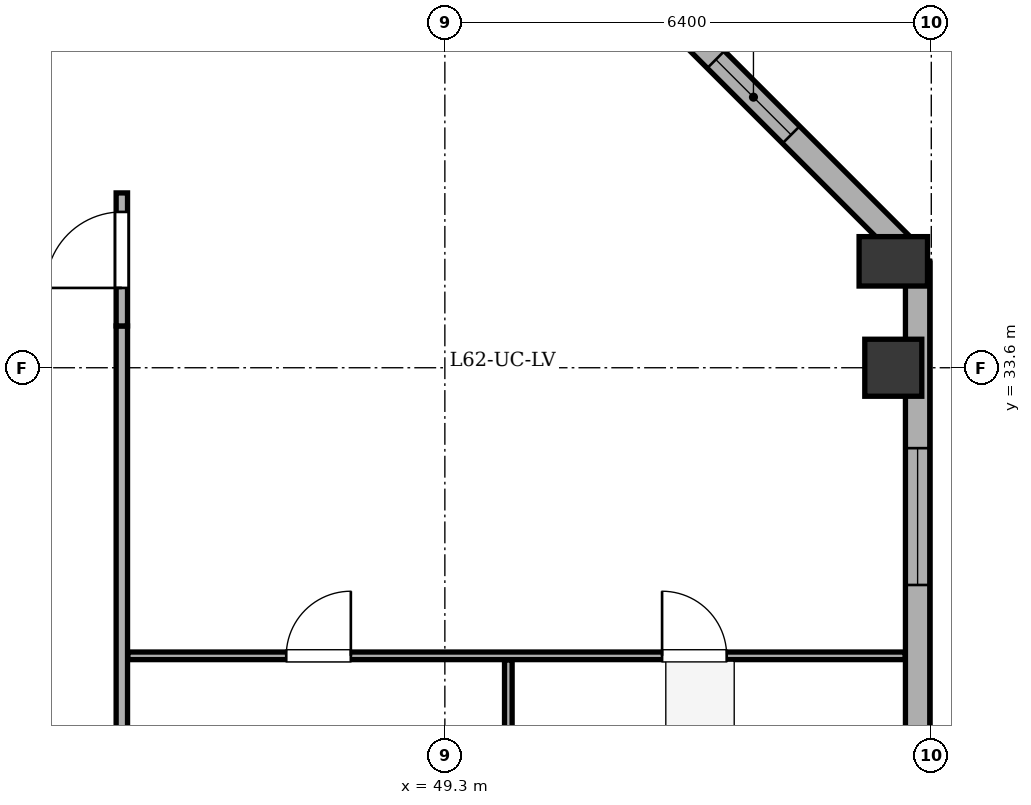
"""IFC4 building model, lengths in metres.
Left out: names, types, materials, properties, quantities, classifications, styles, units other than length and angle.
Written with IfcOpenShell. Run it as: python <this file> out.ifc"""

import sys

from ifc_helpers import new_model, si_unit, direction, frame, frame_2d, origin, origin_2d, place, context, subcontext, project, spatial, rectangle, extrude, element, fill, save


model = new_model("IFC4")
c1 = context("Model", 3, precision=1e-05, world=origin(), true_north=direction((0.0, 1.0)))
c2 = subcontext(c1, "Body", "Model", "MODEL_VIEW")
j1 = project(units=[si_unit("LENGTHUNIT", "METRE"), si_unit("PLANEANGLEUNIT", "RADIAN")], contexts=[c1])
p1 = place(None, origin())
s1 = spatial("IfcSite", under=j1, at=p1, CompositionType="ELEMENT")
p2 = place(p1, origin())
s2 = spatial("IfcBuilding", under=s1, at=p2, CompositionType="ELEMENT")
p3 = place(p2, frame((0.0, 0.0, 238.1)))
s3 = spatial("IfcBuildingStorey", under=s2, at=p3, CompositionType="ELEMENT", Elevation=238.1)
p4 = place(p3, frame((55.2, 33.6, 0.0), z_axis=(0.0, 0.0, 1.0), x_axis=(1.0, 0.0, 0.0)))
e1 = element("IfcColumn", 1, at=p4, inside=s3, PredefinedType="COLUMN", context=c2, shape_type="SweptSolid", body=[
    extrude(rectangle(XDim=0.75, YDim=0.75, at=origin_2d()), origin(), (0.0, 0.0, 1.0), 3.4),
])
p5 = place(p3, frame((55.2, 35.0, 0.0), z_axis=(0.0, 0.0, 1.0), x_axis=(1.0, 0.0, 0.0)))
e2 = element("IfcColumn", 2, at=p5, inside=s3, PredefinedType="COLUMN", context=c2, shape_type="SweptSolid", body=[
    extrude(rectangle(XDim=0.65, YDim=0.9, at=origin_2d()), origin(), (0.0, 0.0, 1.0), 3.4),
])
p6 = place(p3, frame((51.2, 39.32, 0.0), z_axis=(0.0, 0.0, 1.0), x_axis=(0.707106781187, -0.707106781187, 0.0)))
e3 = element("IfcWall", 3, at=p6, inside=s3, PredefinedType="STANDARD", context=c2, shape_type="SweptSolid", body=[
    extrude(rectangle(XDim=6.11, YDim=0.32, at=frame_2d((3.055, 0.0))), origin(), (0.0, 0.0, 1.0), 2.725),
])
p7 = place(p6, frame((2.355, 0.0, 0.75)))
e4 = element("IfcOpeningElement", 4, at=p7, cuts=e3, PredefinedType="OPENING", context=c2, shape_type="SweptSolid", body=[
    extrude(rectangle(XDim=1.4, YDim=1.65, at=frame_2d((0.7, 0.825))), frame((0.0, 0.17, 0.0), z_axis=(0.0, -1.0, 0.0), x_axis=(1.0, 0.0, 0.0)), (0.0, 0.0, 1.0), 0.34),
])
p8 = place(p3, frame((55.52, 35.0, 0.0), z_axis=(0.0, 0.0, 1.0), x_axis=(0.0, -1.0, 0.0)))
e5 = element("IfcWall", 5, at=p8, inside=s3, PredefinedType="STANDARD", context=c2, shape_type="SweptSolid", body=[
    extrude(rectangle(XDim=27.8, YDim=0.32, at=frame_2d((13.9, 0.0))), origin(), (0.0, 0.0, 1.0), 2.725),
])
p9 = place(p8, frame((2.458, 0.0, 0.75)))
e6 = element("IfcOpeningElement", 6, at=p9, cuts=e5, PredefinedType="OPENING", context=c2, shape_type="SweptSolid", body=[
    extrude(rectangle(XDim=1.8, YDim=1.7, at=frame_2d((0.9, 0.85))), frame((0.0, 0.17, 0.0), z_axis=(0.0, -1.0, 0.0), x_axis=(1.0, 0.0, 0.0)), (0.0, 0.0, 1.0), 0.34),
])
p10 = place(p8, frame((11.342, 0.0, 0.75)))
e7 = element("IfcOpeningElement", 7, at=p10, cuts=e5, PredefinedType="OPENING", context=c2, shape_type="SweptSolid", body=[
    extrude(rectangle(XDim=1.8, YDim=1.7, at=frame_2d((0.9, 0.85))), frame((0.0, 0.17, 0.0), z_axis=(0.0, -1.0, 0.0), x_axis=(1.0, 0.0, 0.0)), (0.0, 0.0, 1.0), 0.34),
])
p11 = place(p8, frame((17.117, 0.0, 0.75)))
e8 = element("IfcOpeningElement", 8, at=p11, cuts=e5, PredefinedType="OPENING", context=c2, shape_type="SweptSolid", body=[
    extrude(rectangle(XDim=1.8, YDim=1.7, at=frame_2d((0.9, 0.85))), frame((0.0, 0.17, 0.0), z_axis=(0.0, -1.0, 0.0), x_axis=(1.0, 0.0, 0.0)), (0.0, 0.0, 1.0), 0.34),
])
p12 = place(p8, frame((22.808, 0.0, 0.75)))
e9 = element("IfcOpeningElement", 9, at=p12, cuts=e5, PredefinedType="OPENING", context=c2, shape_type="SweptSolid", body=[
    extrude(rectangle(XDim=2.2, YDim=1.7, at=frame_2d((1.1, 0.85))), frame((0.0, 0.17, 0.0), z_axis=(0.0, -1.0, 0.0), x_axis=(1.0, 0.0, 0.0)), (0.0, 0.0, 1.0), 0.34),
])
p13 = place(p3, frame((45.05, 20.25, 0.0), z_axis=(0.0, 0.0, 1.0), x_axis=(0.0, 1.0, 0.0)))
e10 = element("IfcWall", 10, at=p13, inside=s3, PredefinedType="PARTITIONING", context=c2, shape_type="SweptSolid", body=[
    extrude(rectangle(XDim=13.9, YDim=0.15, at=frame_2d((6.95, 0.0))), origin(), (0.0, 0.0, 1.0), 2.725),
])
p14 = place(p3, frame((45.05, 34.15, 0.0), z_axis=(0.0, 0.0, 1.0), x_axis=(0.0, 1.0, 0.0)))
e11 = element("IfcWall", 11, at=p14, inside=s3, PredefinedType="PARTITIONING", context=c2, shape_type="SweptSolid", body=[
    extrude(rectangle(XDim=1.75, YDim=0.15, at=frame_2d((0.875, 0.0))), origin(), (0.0, 0.0, 1.0), 2.725),
])
p15 = place(p14, frame((0.5, 0.0, 0.0)))
e12 = element("IfcOpeningElement", 12, at=p15, cuts=e11, PredefinedType="OPENING", context=c2, shape_type="SweptSolid", body=[
    extrude(rectangle(XDim=1.0, YDim=2.1, at=frame_2d((0.5, 1.05))), frame((0.0, 0.085, 0.0), z_axis=(0.0, -1.0, 0.0), x_axis=(1.0, 0.0, 0.0)), (0.0, 0.0, 1.0), 0.17),
])
p16 = place(p3, frame((45.13, 29.81, 0.0), z_axis=(0.0, 0.0, 1.0), x_axis=(1.0, 0.0, 0.0)))
e13 = element("IfcWall", 13, at=p16, inside=s3, PredefinedType="PARTITIONING", context=c2, shape_type="SweptSolid", body=[
    extrude(rectangle(XDim=10.225, YDim=0.1, at=frame_2d((5.113, 0.0))), origin(), (0.0, 0.0, 1.0), 3.1),
])
p17 = place(p16, frame((2.083, 0.0, 0.0)))
e14 = element("IfcOpeningElement", 14, at=p17, cuts=e13, PredefinedType="OPENING", context=c2, shape_type="SweptSolid", body=[
    extrude(rectangle(XDim=0.85, YDim=2.05, at=frame_2d((0.425, 1.025))), frame((0.0, 0.06, 0.0), z_axis=(0.0, -1.0, 0.0), x_axis=(1.0, 0.0, 0.0)), (0.0, 0.0, 1.0), 0.12),
])
p18 = place(p16, frame((7.028, 0.0, 0.0)))
e15 = element("IfcOpeningElement", 15, at=p18, cuts=e13, PredefinedType="OPENING", context=c2, shape_type="SweptSolid", body=[
    extrude(rectangle(XDim=0.85, YDim=2.05, at=frame_2d((0.425, 1.025))), frame((0.0, 0.06, 0.0), z_axis=(0.0, -1.0, 0.0), x_axis=(1.0, 0.0, 0.0)), (0.0, 0.0, 1.0), 0.12),
])
p19 = place(p3, frame((50.135, 27.28, 0.0), z_axis=(0.0, 0.0, 1.0), x_axis=(0.0, 1.0, 0.0)))
e16 = element("IfcWall", 16, at=p19, inside=s3, PredefinedType="PARTITIONING", context=c2, shape_type="SweptSolid", body=[
    extrude(rectangle(XDim=2.475, YDim=0.1, at=frame_2d((1.237, 0.0))), origin(), (0.0, 0.0, 1.0), 3.1),
])
p20 = place(p9, origin())
e17 = element("IfcWindow", 17, at=p20, inside=s3, PartitioningType="SINGLE_PANEL", PredefinedType="WINDOW", context=c2, shape_type="SweptSolid", body=[
    extrude(rectangle(XDim=1.8, YDim=1.7, at=frame_2d((0.9, 0.85))), frame((0.0, -0.01, 0.0), z_axis=(0.0, -1.0, 0.0), x_axis=(1.0, 0.0, 0.0)), (0.0, 0.0, 1.0), 0.06),
])
fill(e6, e17)
p21 = place(p7, origin())
e18 = element("IfcWindow", 18, at=p21, inside=s3, PartitioningType="SINGLE_PANEL", PredefinedType="WINDOW", context=c2, shape_type="SweptSolid", body=[
    extrude(rectangle(XDim=1.4, YDim=1.65, at=frame_2d((0.7, 0.825))), frame((0.0, -0.01, 0.0), z_axis=(0.0, -1.0, 0.0), x_axis=(1.0, 0.0, 0.0)), (0.0, 0.0, 1.0), 0.06),
])
fill(e4, e18)
p22 = place(p15, origin())
e19 = element("IfcDoor", 19, at=p22, inside=s3, OperationType="SINGLE_SWING_LEFT", PredefinedType="DOOR", context=c2, shape_type="SweptSolid", body=[
    extrude(rectangle(XDim=1.0, YDim=2.1, at=frame_2d((0.5, 1.05))), frame((0.0, 0.025, 0.0), z_axis=(0.0, -1.0, 0.0), x_axis=(1.0, 0.0, 0.0)), (0.0, 0.0, 1.0), 0.05),
])
fill(e12, e19)
p23 = place(p17, origin())
e20 = element("IfcDoor", 20, at=p23, inside=s3, OperationType="SINGLE_SWING_RIGHT", PredefinedType="DOOR", context=c2, shape_type="SweptSolid", body=[
    extrude(rectangle(XDim=0.85, YDim=2.05, at=frame_2d((0.425, 1.025))), frame((0.0, 0.025, 0.0), z_axis=(0.0, -1.0, 0.0), x_axis=(1.0, 0.0, 0.0)), (0.0, 0.0, 1.0), 0.05),
])
fill(e14, e20)
p24 = place(p18, origin())
e21 = element("IfcDoor", 21, at=p24, inside=s3, OperationType="SINGLE_SWING_LEFT", PredefinedType="DOOR", context=c2, shape_type="SweptSolid", body=[
    extrude(rectangle(XDim=0.85, YDim=2.05, at=frame_2d((0.425, 1.025))), frame((0.0, 0.025, 0.0), z_axis=(0.0, -1.0, 0.0), x_axis=(1.0, 0.0, 0.0)), (0.0, 0.0, 1.0), 0.05),
])
fill(e15, e21)
save(model, sys.argv[1])
